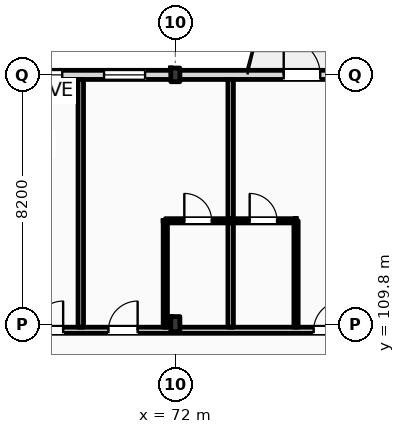
"""IFC4 building model, lengths in metres.
Left out: names, types, materials, properties, quantities, classifications, styles, units other than length and angle.
Written with IfcOpenShell. Run it as: python <this file> out.ifc"""

import sys

from ifc_helpers import new_model, si_unit, direction, frame, frame_2d, origin, origin_2d, place, context, subcontext, project, spatial, rectangle, i_section, extrude, element, fill, save


model = new_model("IFC4")
c1 = context("Model", 3, precision=1e-05, world=origin(), true_north=direction((0.0, 1.0)))
c2 = subcontext(c1, "Body", "Model", "MODEL_VIEW")
j1 = project(units=[si_unit("LENGTHUNIT", "METRE"), si_unit("PLANEANGLEUNIT", "RADIAN")], contexts=[c1])
p1 = place(None, origin())
s1 = spatial("IfcSite", under=j1, at=p1, CompositionType="ELEMENT")
p2 = place(p1, origin())
s2 = spatial("IfcBuilding", under=s1, at=p2, CompositionType="ELEMENT")
p3 = place(p2, frame((0.0, 0.0, 31.8)))
s3 = spatial("IfcBuildingStorey", under=s2, at=p3, CompositionType="ELEMENT", Elevation=31.8)
p4 = place(p3, frame((72.0, 109.8, 0.0), z_axis=(0.0, 0.0, 1.0), x_axis=(1.0, 0.0, 0.0)))
e1 = element("IfcColumn", 1, at=p4, inside=s3, PredefinedType="COLUMN", context=c2, shape_type="SweptSolid", body=[
    extrude(i_section(OverallWidth=0.3, OverallDepth=0.5, WebThickness=0.014, FlangeThickness=0.028, FilletRadius=0.027, at=origin_2d()), origin(), (0.0, 0.0, 1.0), 3.6),
])
p5 = place(p3, frame((72.0, 118.0, 0.0), z_axis=(0.0, 0.0, 1.0), x_axis=(1.0, 0.0, 0.0)))
e2 = element("IfcColumn", 2, at=p5, inside=s3, PredefinedType="COLUMN", context=c2, shape_type="SweptSolid", body=[
    extrude(i_section(OverallWidth=0.3, OverallDepth=0.45, WebThickness=0.014, FlangeThickness=0.026, FilletRadius=0.027, at=origin_2d()), origin(), (0.0, 0.0, 1.0), 3.6),
])
p6 = place(p3, frame((22.5, 118.0, 0.0), z_axis=(0.0, 0.0, 1.0), x_axis=(1.0, 0.0, 0.0)))
e3 = element("IfcWall", 3, at=p6, inside=s3, PredefinedType="STANDARD", context=c2, shape_type="SweptSolid", body=[
    extrude(rectangle(XDim=97.5, YDim=0.3, at=frame_2d((48.75, 0.0))), origin(), (0.0, 0.0, 1.0), 2.72),
])
p7 = place(p6, frame((3.61, 0.0, 0.9)))
e4 = element("IfcOpeningElement", 4, at=p7, cuts=e3, PredefinedType="OPENING", context=c2, shape_type="SweptSolid", body=[
    extrude(rectangle(XDim=1.1, YDim=1.64, at=frame_2d((0.55, 0.82))), frame((0.0, 0.16, 0.0), z_axis=(0.0, -1.0, 0.0), x_axis=(1.0, 0.0, 0.0)), (0.0, 0.0, 1.0), 0.32),
])
p8 = place(p6, frame((6.855, 0.0, 0.0)))
e5 = element("IfcOpeningElement", 5, at=p8, cuts=e3, PredefinedType="OPENING", context=c2, shape_type="SweptSolid", body=[
    extrude(rectangle(XDim=1.2, YDim=2.25, at=frame_2d((0.6, 1.125))), frame((0.0, 0.16, 0.0), z_axis=(0.0, -1.0, 0.0), x_axis=(1.0, 0.0, 0.0)), (0.0, 0.0, 1.0), 0.32),
])
p9 = place(p6, frame((11.405, 0.0, 0.9)))
e6 = element("IfcOpeningElement", 6, at=p9, cuts=e3, PredefinedType="OPENING", context=c2, shape_type="SweptSolid", body=[
    extrude(rectangle(XDim=2.1, YDim=1.64, at=frame_2d((1.05, 0.82))), frame((0.0, 0.16, 0.0), z_axis=(0.0, -1.0, 0.0), x_axis=(1.0, 0.0, 0.0)), (0.0, 0.0, 1.0), 0.32),
])
p10 = place(p6, frame((15.13, 0.0, 0.9)))
e7 = element("IfcOpeningElement", 7, at=p10, cuts=e3, PredefinedType="OPENING", context=c2, shape_type="SweptSolid", body=[
    extrude(rectangle(XDim=2.25, YDim=1.64, at=frame_2d((1.125, 0.82))), frame((0.0, 0.16, 0.0), z_axis=(0.0, -1.0, 0.0), x_axis=(1.0, 0.0, 0.0)), (0.0, 0.0, 1.0), 0.32),
])
p11 = place(p6, frame((21.53, 0.0, 0.0)))
e8 = element("IfcOpeningElement", 8, at=p11, cuts=e3, PredefinedType="OPENING", context=c2, shape_type="SweptSolid", body=[
    extrude(rectangle(XDim=1.2, YDim=2.25, at=frame_2d((0.6, 1.125))), frame((0.0, 0.16, 0.0), z_axis=(0.0, -1.0, 0.0), x_axis=(1.0, 0.0, 0.0)), (0.0, 0.0, 1.0), 0.32),
])
p12 = place(p6, frame((24.18, 0.0, 0.9)))
e9 = element("IfcOpeningElement", 9, at=p12, cuts=e3, PredefinedType="OPENING", context=c2, shape_type="SweptSolid", body=[
    extrude(rectangle(XDim=1.1, YDim=1.64, at=frame_2d((0.55, 0.82))), frame((0.0, 0.16, 0.0), z_axis=(0.0, -1.0, 0.0), x_axis=(1.0, 0.0, 0.0)), (0.0, 0.0, 1.0), 0.32),
])
p13 = place(p6, frame((29.105, 0.0, 0.9)))
e10 = element("IfcOpeningElement", 10, at=p13, cuts=e3, PredefinedType="OPENING", context=c2, shape_type="SweptSolid", body=[
    extrude(rectangle(XDim=2.7, YDim=1.64, at=frame_2d((1.35, 0.82))), frame((0.0, 0.16, 0.0), z_axis=(0.0, -1.0, 0.0), x_axis=(1.0, 0.0, 0.0)), (0.0, 0.0, 1.0), 0.32),
])
p14 = place(p6, frame((34.83, 0.0, 0.9)))
e11 = element("IfcOpeningElement", 11, at=p14, cuts=e3, PredefinedType="OPENING", context=c2, shape_type="SweptSolid", body=[
    extrude(rectangle(XDim=1.8, YDim=1.64, at=frame_2d((0.9, 0.82))), frame((0.0, 0.16, 0.0), z_axis=(0.0, -1.0, 0.0), x_axis=(1.0, 0.0, 0.0)), (0.0, 0.0, 1.0), 0.32),
])
p15 = place(p6, frame((38.525, 0.0, 0.0)))
e12 = element("IfcOpeningElement", 12, at=p15, cuts=e3, PredefinedType="OPENING", context=c2, shape_type="SweptSolid", body=[
    extrude(rectangle(XDim=1.2, YDim=2.25, at=frame_2d((0.6, 1.125))), frame((0.0, 0.16, 0.0), z_axis=(0.0, -1.0, 0.0), x_axis=(1.0, 0.0, 0.0)), (0.0, 0.0, 1.0), 0.32),
])
p16 = place(p6, frame((42.73, 0.0, 0.9)))
e13 = element("IfcOpeningElement", 13, at=p16, cuts=e3, PredefinedType="OPENING", context=c2, shape_type="SweptSolid", body=[
    extrude(rectangle(XDim=3.05, YDim=1.64, at=frame_2d((1.525, 0.82))), frame((0.0, 0.16, 0.0), z_axis=(0.0, -1.0, 0.0), x_axis=(1.0, 0.0, 0.0)), (0.0, 0.0, 1.0), 0.32),
])
p17 = place(p6, frame((47.155, 0.0, 0.9)))
e14 = element("IfcOpeningElement", 14, at=p17, cuts=e3, PredefinedType="OPENING", context=c2, shape_type="SweptSolid", body=[
    extrude(rectangle(XDim=1.35, YDim=1.64, at=frame_2d((0.675, 0.82))), frame((0.0, 0.16, 0.0), z_axis=(0.0, -1.0, 0.0), x_axis=(1.0, 0.0, 0.0)), (0.0, 0.0, 1.0), 0.32),
])
p18 = place(p6, frame((53.065, 0.0, 0.0)))
e15 = element("IfcOpeningElement", 15, at=p18, cuts=e3, PredefinedType="OPENING", context=c2, shape_type="SweptSolid", body=[
    extrude(rectangle(XDim=1.2, YDim=2.25, at=frame_2d((0.6, 1.125))), frame((0.0, 0.16, 0.0), z_axis=(0.0, -1.0, 0.0), x_axis=(1.0, 0.0, 0.0)), (0.0, 0.0, 1.0), 0.32),
])
p19 = place(p6, frame((58.2, 0.0, 0.9)))
e16 = element("IfcOpeningElement", 16, at=p19, cuts=e3, PredefinedType="OPENING", context=c2, shape_type="SweptSolid", body=[
    extrude(rectangle(XDim=1.8, YDim=1.64, at=frame_2d((0.9, 0.82))), frame((0.0, 0.16, 0.0), z_axis=(0.0, -1.0, 0.0), x_axis=(1.0, 0.0, 0.0)), (0.0, 0.0, 1.0), 0.32),
])
p20 = place(p6, frame((61.13, 0.0, 0.9)))
e17 = element("IfcOpeningElement", 17, at=p20, cuts=e3, PredefinedType="OPENING", context=c2, shape_type="SweptSolid", body=[
    extrude(rectangle(XDim=3.05, YDim=1.64, at=frame_2d((1.525, 0.82))), frame((0.0, 0.16, 0.0), z_axis=(0.0, -1.0, 0.0), x_axis=(1.0, 0.0, 0.0)), (0.0, 0.0, 1.0), 0.32),
])
p21 = place(p6, frame((67.93, 0.0, 0.0)))
e18 = element("IfcOpeningElement", 18, at=p21, cuts=e3, PredefinedType="OPENING", context=c2, shape_type="SweptSolid", body=[
    extrude(rectangle(XDim=1.2, YDim=2.25, at=frame_2d((0.6, 1.125))), frame((0.0, 0.16, 0.0), z_axis=(0.0, -1.0, 0.0), x_axis=(1.0, 0.0, 0.0)), (0.0, 0.0, 1.0), 0.32),
])
p22 = place(p6, frame((70.39, 0.0, 0.0)))
e19 = element("IfcOpeningElement", 19, at=p22, cuts=e3, PredefinedType="OPENING", context=c2, shape_type="SweptSolid", body=[
    extrude(rectangle(XDim=1.2, YDim=2.25, at=frame_2d((0.6, 1.125))), frame((0.0, 0.16, 0.0), z_axis=(0.0, -1.0, 0.0), x_axis=(1.0, 0.0, 0.0)), (0.0, 0.0, 1.0), 0.32),
])
p23 = place(p6, frame((75.905, 0.0, 0.9)))
e20 = element("IfcOpeningElement", 20, at=p23, cuts=e3, PredefinedType="OPENING", context=c2, shape_type="SweptSolid", body=[
    extrude(rectangle(XDim=1.1, YDim=1.5, at=frame_2d((0.55, 0.75))), frame((0.0, 0.16, 0.0), z_axis=(0.0, -1.0, 0.0), x_axis=(1.0, 0.0, 0.0)), (0.0, 0.0, 1.0), 0.32),
])
p24 = place(p6, frame((81.63, 0.0, 0.9)))
e21 = element("IfcOpeningElement", 21, at=p24, cuts=e3, PredefinedType="OPENING", context=c2, shape_type="SweptSolid", body=[
    extrude(rectangle(XDim=1.1, YDim=1.6, at=frame_2d((0.55, 0.8))), frame((0.0, 0.16, 0.0), z_axis=(0.0, -1.0, 0.0), x_axis=(1.0, 0.0, 0.0)), (0.0, 0.0, 1.0), 0.32),
])
p25 = place(p6, frame((84.955, 0.0, 0.9)))
e22 = element("IfcOpeningElement", 22, at=p25, cuts=e3, PredefinedType="OPENING", context=c2, shape_type="SweptSolid", body=[
    extrude(rectangle(XDim=1.4, YDim=1.64, at=frame_2d((0.7, 0.82))), frame((0.0, 0.16, 0.0), z_axis=(0.0, -1.0, 0.0), x_axis=(1.0, 0.0, 0.0)), (0.0, 0.0, 1.0), 0.32),
])
p26 = place(p6, frame((90.055, 0.0, 0.9)))
e23 = element("IfcOpeningElement", 23, at=p26, cuts=e3, PredefinedType="OPENING", context=c2, shape_type="SweptSolid", body=[
    extrude(rectangle(XDim=1.6, YDim=1.64, at=frame_2d((0.8, 0.82))), frame((0.0, 0.16, 0.0), z_axis=(0.0, -1.0, 0.0), x_axis=(1.0, 0.0, 0.0)), (0.0, 0.0, 1.0), 0.32),
])
p27 = place(p6, frame((93.87, 0.0, 0.9)))
e24 = element("IfcOpeningElement", 24, at=p27, cuts=e3, PredefinedType="OPENING", context=c2, shape_type="SweptSolid", body=[
    extrude(rectangle(XDim=1.75, YDim=1.64, at=frame_2d((0.875, 0.82))), frame((0.0, 0.16, 0.0), z_axis=(0.0, -1.0, 0.0), x_axis=(1.0, 0.0, 0.0)), (0.0, 0.0, 1.0), 0.32),
])
p28 = place(p3, frame((10.65, 109.6, 0.0), z_axis=(0.0, 0.0, 1.0), x_axis=(1.0, 0.0, 0.0)))
e25 = element("IfcWall", 25, at=p28, inside=s3, PredefinedType="PARTITIONING", context=c2, shape_type="SweptSolid", body=[
    extrude(rectangle(XDim=109.21, YDim=0.2, at=frame_2d((54.605, 0.0))), origin(), (0.0, 0.0, 1.0), 2.72),
])
p29 = place(p28, frame((15.825, 0.0, 0.0)))
e26 = element("IfcOpeningElement", 26, at=p29, cuts=e25, PredefinedType="OPENING", context=c2, shape_type="SweptSolid", body=[
    extrude(rectangle(XDim=1.02, YDim=2.2, at=frame_2d((0.51, 1.1))), frame((0.0, 0.11, 0.0), z_axis=(0.0, -1.0, 0.0), x_axis=(1.0, 0.0, 0.0)), (0.0, 0.0, 1.0), 0.22),
])
p30 = place(p28, frame((19.87, 0.0, 0.0)))
e27 = element("IfcOpeningElement", 27, at=p30, cuts=e25, PredefinedType="OPENING", context=c2, shape_type="SweptSolid", body=[
    extrude(rectangle(XDim=1.02, YDim=2.2, at=frame_2d((0.51, 1.1))), frame((0.0, 0.11, 0.0), z_axis=(0.0, -1.0, 0.0), x_axis=(1.0, 0.0, 0.0)), (0.0, 0.0, 1.0), 0.22),
])
p31 = place(p28, frame((24.47, 0.0, 0.0)))
e28 = element("IfcOpeningElement", 28, at=p31, cuts=e25, PredefinedType="OPENING", context=c2, shape_type="SweptSolid", body=[
    extrude(rectangle(XDim=1.02, YDim=2.2, at=frame_2d((0.51, 1.1))), frame((0.0, 0.11, 0.0), z_axis=(0.0, -1.0, 0.0), x_axis=(1.0, 0.0, 0.0)), (0.0, 0.0, 1.0), 0.22),
])
p32 = place(p28, frame((26.92, 0.0, 0.0)))
e29 = element("IfcOpeningElement", 29, at=p32, cuts=e25, PredefinedType="OPENING", context=c2, shape_type="SweptSolid", body=[
    extrude(rectangle(XDim=1.02, YDim=2.2, at=frame_2d((0.51, 1.1))), frame((0.0, 0.11, 0.0), z_axis=(0.0, -1.0, 0.0), x_axis=(1.0, 0.0, 0.0)), (0.0, 0.0, 1.0), 0.22),
])
p33 = place(p28, frame((33.7, 0.0, 0.0)))
e30 = element("IfcOpeningElement", 30, at=p33, cuts=e25, PredefinedType="OPENING", context=c2, shape_type="SweptSolid", body=[
    extrude(rectangle(XDim=0.96, YDim=2.2, at=frame_2d((0.48, 1.1))), frame((0.0, 0.11, 0.0), z_axis=(0.0, -1.0, 0.0), x_axis=(1.0, 0.0, 0.0)), (0.0, 0.0, 1.0), 0.22),
])
p34 = place(p28, frame((35.9, 0.0, 0.0)))
e31 = element("IfcOpeningElement", 31, at=p34, cuts=e25, PredefinedType="OPENING", context=c2, shape_type="SweptSolid", body=[
    extrude(rectangle(XDim=0.96, YDim=2.2, at=frame_2d((0.48, 1.1))), frame((0.0, 0.11, 0.0), z_axis=(0.0, -1.0, 0.0), x_axis=(1.0, 0.0, 0.0)), (0.0, 0.0, 1.0), 0.22),
])
p35 = place(p28, frame((42.9, 0.0, 0.0)))
e32 = element("IfcOpeningElement", 32, at=p35, cuts=e25, PredefinedType="OPENING", context=c2, shape_type="SweptSolid", body=[
    extrude(rectangle(XDim=0.96, YDim=2.2, at=frame_2d((0.48, 1.1))), frame((0.0, 0.11, 0.0), z_axis=(0.0, -1.0, 0.0), x_axis=(1.0, 0.0, 0.0)), (0.0, 0.0, 1.0), 0.22),
])
p36 = place(p28, frame((47.5, 0.0, 0.0)))
e33 = element("IfcOpeningElement", 33, at=p36, cuts=e25, PredefinedType="OPENING", context=c2, shape_type="SweptSolid", body=[
    extrude(rectangle(XDim=0.96, YDim=2.2, at=frame_2d((0.48, 1.1))), frame((0.0, 0.11, 0.0), z_axis=(0.0, -1.0, 0.0), x_axis=(1.0, 0.0, 0.0)), (0.0, 0.0, 1.0), 0.22),
])
p37 = place(p28, frame((49.95, 0.0, 0.0)))
e34 = element("IfcOpeningElement", 34, at=p37, cuts=e25, PredefinedType="OPENING", context=c2, shape_type="SweptSolid", body=[
    extrude(rectangle(XDim=0.96, YDim=2.2, at=frame_2d((0.48, 1.1))), frame((0.0, 0.11, 0.0), z_axis=(0.0, -1.0, 0.0), x_axis=(1.0, 0.0, 0.0)), (0.0, 0.0, 1.0), 0.22),
])
p38 = place(p28, frame((56.7, 0.0, 0.0)))
e35 = element("IfcOpeningElement", 35, at=p38, cuts=e25, PredefinedType="OPENING", context=c2, shape_type="SweptSolid", body=[
    extrude(rectangle(XDim=0.96, YDim=2.2, at=frame_2d((0.48, 1.1))), frame((0.0, 0.11, 0.0), z_axis=(0.0, -1.0, 0.0), x_axis=(1.0, 0.0, 0.0)), (0.0, 0.0, 1.0), 0.22),
])
p39 = place(p28, frame((59.15, 0.0, 0.0)))
e36 = element("IfcOpeningElement", 36, at=p39, cuts=e25, PredefinedType="OPENING", context=c2, shape_type="SweptSolid", body=[
    extrude(rectangle(XDim=0.96, YDim=2.2, at=frame_2d((0.48, 1.1))), frame((0.0, 0.11, 0.0), z_axis=(0.0, -1.0, 0.0), x_axis=(1.0, 0.0, 0.0)), (0.0, 0.0, 1.0), 0.22),
])
p40 = place(p28, frame((65.9, 0.0, 0.0)))
e37 = element("IfcOpeningElement", 37, at=p40, cuts=e25, PredefinedType="OPENING", context=c2, shape_type="SweptSolid", body=[
    extrude(rectangle(XDim=0.96, YDim=2.2, at=frame_2d((0.48, 1.1))), frame((0.0, 0.11, 0.0), z_axis=(0.0, -1.0, 0.0), x_axis=(1.0, 0.0, 0.0)), (0.0, 0.0, 1.0), 0.22),
])
p41 = place(p28, frame((70.5, 0.0, 0.0)))
e38 = element("IfcOpeningElement", 38, at=p41, cuts=e25, PredefinedType="OPENING", context=c2, shape_type="SweptSolid", body=[
    extrude(rectangle(XDim=0.96, YDim=2.2, at=frame_2d((0.48, 1.1))), frame((0.0, 0.11, 0.0), z_axis=(0.0, -1.0, 0.0), x_axis=(1.0, 0.0, 0.0)), (0.0, 0.0, 1.0), 0.22),
])
p42 = place(p28, frame((72.95, 0.0, 0.0)))
e39 = element("IfcOpeningElement", 39, at=p42, cuts=e25, PredefinedType="OPENING", context=c2, shape_type="SweptSolid", body=[
    extrude(rectangle(XDim=0.96, YDim=2.2, at=frame_2d((0.48, 1.1))), frame((0.0, 0.11, 0.0), z_axis=(0.0, -1.0, 0.0), x_axis=(1.0, 0.0, 0.0)), (0.0, 0.0, 1.0), 0.22),
])
p43 = place(p28, frame((79.7, 0.0, 0.0)))
e40 = element("IfcOpeningElement", 40, at=p43, cuts=e25, PredefinedType="OPENING", context=c2, shape_type="SweptSolid", body=[
    extrude(rectangle(XDim=0.96, YDim=2.2, at=frame_2d((0.48, 1.1))), frame((0.0, 0.11, 0.0), z_axis=(0.0, -1.0, 0.0), x_axis=(1.0, 0.0, 0.0)), (0.0, 0.0, 1.0), 0.22),
])
p44 = place(p28, frame((82.15, 0.0, 0.0)))
e41 = element("IfcOpeningElement", 41, at=p44, cuts=e25, PredefinedType="OPENING", context=c2, shape_type="SweptSolid", body=[
    extrude(rectangle(XDim=0.96, YDim=2.2, at=frame_2d((0.48, 1.1))), frame((0.0, 0.11, 0.0), z_axis=(0.0, -1.0, 0.0), x_axis=(1.0, 0.0, 0.0)), (0.0, 0.0, 1.0), 0.22),
])
p45 = place(p28, frame((88.9, 0.0, 0.0)))
e42 = element("IfcOpeningElement", 42, at=p45, cuts=e25, PredefinedType="OPENING", context=c2, shape_type="SweptSolid", body=[
    extrude(rectangle(XDim=0.96, YDim=2.2, at=frame_2d((0.48, 1.1))), frame((0.0, 0.11, 0.0), z_axis=(0.0, -1.0, 0.0), x_axis=(1.0, 0.0, 0.0)), (0.0, 0.0, 1.0), 0.22),
])
p46 = place(p28, frame((93.75, 0.0, 0.0)))
e43 = element("IfcOpeningElement", 43, at=p46, cuts=e25, PredefinedType="OPENING", context=c2, shape_type="SweptSolid", body=[
    extrude(rectangle(XDim=0.96, YDim=2.2, at=frame_2d((0.48, 1.1))), frame((0.0, 0.11, 0.0), z_axis=(0.0, -1.0, 0.0), x_axis=(1.0, 0.0, 0.0)), (0.0, 0.0, 1.0), 0.22),
])
p47 = place(p28, frame((98.1, 0.0, 0.0)))
e44 = element("IfcOpeningElement", 44, at=p47, cuts=e25, PredefinedType="OPENING", context=c2, shape_type="SweptSolid", body=[
    extrude(rectangle(XDim=0.96, YDim=2.2, at=frame_2d((0.48, 1.1))), frame((0.0, 0.11, 0.0), z_axis=(0.0, -1.0, 0.0), x_axis=(1.0, 0.0, 0.0)), (0.0, 0.0, 1.0), 0.22),
])
p48 = place(p28, frame((102.7, 0.0, 0.0)))
e45 = element("IfcOpeningElement", 45, at=p48, cuts=e25, PredefinedType="OPENING", context=c2, shape_type="SweptSolid", body=[
    extrude(rectangle(XDim=0.96, YDim=2.2, at=frame_2d((0.48, 1.1))), frame((0.0, 0.11, 0.0), z_axis=(0.0, -1.0, 0.0), x_axis=(1.0, 0.0, 0.0)), (0.0, 0.0, 1.0), 0.22),
])
p49 = place(p28, frame((105.04, 0.0, 0.0)))
e46 = element("IfcOpeningElement", 46, at=p49, cuts=e25, PredefinedType="OPENING", context=c2, shape_type="SweptSolid", body=[
    extrude(rectangle(XDim=0.96, YDim=2.2, at=frame_2d((0.48, 1.1))), frame((0.0, 0.11, 0.0), z_axis=(0.0, -1.0, 0.0), x_axis=(1.0, 0.0, 0.0)), (0.0, 0.0, 1.0), 0.22),
])
p50 = place(p28, frame((2.716, 0.0, 0.0)))
e47 = element("IfcOpeningElement", 47, at=p50, cuts=e25, PredefinedType="OPENING", context=c2, shape_type="SweptSolid", body=[
    extrude(rectangle(XDim=1.35, YDim=2.25, at=frame_2d((0.675, 1.125))), frame((0.0, 0.11, 0.0), z_axis=(0.0, -1.0, 0.0), x_axis=(1.0, 0.0, 0.0)), (0.0, 0.0, 1.0), 0.22),
])
p51 = place(p28, frame((6.65, 0.0, 0.0)))
e48 = element("IfcOpeningElement", 48, at=p51, cuts=e25, PredefinedType="OPENING", context=c2, shape_type="SweptSolid", body=[
    extrude(rectangle(XDim=1.35, YDim=2.25, at=frame_2d((0.675, 1.125))), frame((0.0, 0.11, 0.0), z_axis=(0.0, -1.0, 0.0), x_axis=(1.0, 0.0, 0.0)), (0.0, 0.0, 1.0), 0.22),
])
p52 = place(p28, frame((10.583, 0.0, 0.0)))
e49 = element("IfcOpeningElement", 49, at=p52, cuts=e25, PredefinedType="OPENING", context=c2, shape_type="SweptSolid", body=[
    extrude(rectangle(XDim=1.35, YDim=2.25, at=frame_2d((0.675, 1.125))), frame((0.0, 0.11, 0.0), z_axis=(0.0, -1.0, 0.0), x_axis=(1.0, 0.0, 0.0)), (0.0, 0.0, 1.0), 0.22),
])
for number, where, z_axis, x_axis in (
    (50, (68.89, 109.7, 0.0), (0.0, 0.0, 1.0), (0.0, 1.0, 0.0)),
    (51, (73.82, 109.7, 0.0), (0.0, 0.0, 1.0), (0.0, 1.0, 0.0)),
):
    element("IfcWall", number, at=place(p3, frame(where, z_axis=z_axis, x_axis=x_axis)), inside=s3, PredefinedType="PARTITIONING", context=c2, shape_type="SweptSolid", body=[
        extrude(rectangle(XDim=8.15, YDim=0.18, at=frame_2d((4.075, 0.0))), origin(), (0.0, 0.0, 1.0), 3.36),
    ])
p53 = place(p3, frame((71.67, 109.7, 0.0), z_axis=(0.0, 0.0, 1.0), x_axis=(0.0, 1.0, 0.0)))
e52 = element("IfcWall", 52, at=p53, inside=s3, PredefinedType="PARTITIONING", context=c2, shape_type="SweptSolid", body=[
    extrude(rectangle(XDim=3.5, YDim=0.14, at=frame_2d((1.75, 0.0))), origin(), (0.0, 0.0, 1.0), 3.36),
])
p54 = place(p3, frame((71.67, 113.2, 0.0), z_axis=(0.0, 0.0, 1.0), x_axis=(1.0, 0.0, 0.0)))
e53 = element("IfcWall", 53, at=p54, inside=s3, PredefinedType="PARTITIONING", context=c2, shape_type="SweptSolid", body=[
    extrude(rectangle(XDim=2.15, YDim=0.14, at=frame_2d((1.075, 0.0))), origin(), (0.0, 0.0, 1.0), 3.36),
])
p55 = place(p54, frame((0.625, 0.0, 0.0)))
e54 = element("IfcOpeningElement", 54, at=p55, cuts=e53, PredefinedType="OPENING", context=c2, shape_type="SweptSolid", body=[
    extrude(rectangle(XDim=0.9, YDim=2.1, at=frame_2d((0.45, 1.05))), frame((0.0, 0.08, 0.0), z_axis=(0.0, -1.0, 0.0), x_axis=(1.0, 0.0, 0.0)), (0.0, 0.0, 1.0), 0.16),
])
p56 = place(p3, frame((75.97, 109.7, 0.0), z_axis=(0.0, 0.0, 1.0), x_axis=(0.0, 1.0, 0.0)))
e55 = element("IfcWall", 55, at=p56, inside=s3, PredefinedType="PARTITIONING", context=c2, shape_type="SweptSolid", body=[
    extrude(rectangle(XDim=3.5, YDim=0.14, at=frame_2d((1.75, 0.0))), origin(), (0.0, 0.0, 1.0), 3.36),
])
p57 = place(p3, frame((73.82, 113.2, 0.0), z_axis=(0.0, 0.0, 1.0), x_axis=(1.0, 0.0, 0.0)))
e56 = element("IfcWall", 56, at=p57, inside=s3, PredefinedType="PARTITIONING", context=c2, shape_type="SweptSolid", body=[
    extrude(rectangle(XDim=2.15, YDim=0.14, at=frame_2d((1.075, 0.0))), origin(), (0.0, 0.0, 1.0), 3.36),
])
p58 = place(p57, frame((0.625, 0.0, 0.0)))
e57 = element("IfcOpeningElement", 57, at=p58, cuts=e56, PredefinedType="OPENING", context=c2, shape_type="SweptSolid", body=[
    extrude(rectangle(XDim=0.9, YDim=2.1, at=frame_2d((0.45, 1.05))), frame((0.0, 0.08, 0.0), z_axis=(0.0, -1.0, 0.0), x_axis=(1.0, 0.0, 0.0)), (0.0, 0.0, 1.0), 0.16),
])
p59 = place(p16, origin())
e58 = element("IfcWindow", 58, at=p59, inside=s3, PartitioningType="DOUBLE_PANEL_VERTICAL", PredefinedType="WINDOW", context=c2, shape_type="SweptSolid", body=[
    extrude(rectangle(XDim=3.05, YDim=1.64, at=frame_2d((1.525, 0.82))), frame((0.0, 0.03, 0.0), z_axis=(0.0, -1.0, 0.0), x_axis=(1.0, 0.0, 0.0)), (0.0, 0.0, 1.0), 0.06),
])
fill(e13, e58)
p60 = place(p17, origin())
e59 = element("IfcWindow", 59, at=p60, inside=s3, PartitioningType="DOUBLE_PANEL_VERTICAL", PredefinedType="WINDOW", context=c2, shape_type="SweptSolid", body=[
    extrude(rectangle(XDim=1.35, YDim=1.64, at=frame_2d((0.675, 0.82))), frame((0.0, 0.03, 0.0), z_axis=(0.0, -1.0, 0.0), x_axis=(1.0, 0.0, 0.0)), (0.0, 0.0, 1.0), 0.06),
])
fill(e14, e59)
p61 = place(p18, origin())
e60 = element("IfcDoor", 60, at=p61, inside=s3, OperationType="SINGLE_SWING_LEFT", PredefinedType="DOOR", context=c2, shape_type="SweptSolid", body=[
    extrude(rectangle(XDim=1.2, YDim=2.25, at=frame_2d((0.6, 1.125))), frame((0.0, 0.025, 0.0), z_axis=(0.0, -1.0, 0.0), x_axis=(1.0, 0.0, 0.0)), (0.0, 0.0, 1.0), 0.05),
])
fill(e15, e60)
p62 = place(p38, origin())
e61 = element("IfcDoor", 61, at=p62, inside=s3, OperationType="SINGLE_SWING_RIGHT", PredefinedType="DOOR", context=c2, shape_type="SweptSolid", body=[
    extrude(rectangle(XDim=0.96, YDim=2.2, at=frame_2d((0.48, 1.1))), frame((0.0, 0.025, 0.0), z_axis=(0.0, -1.0, 0.0), x_axis=(1.0, 0.0, 0.0)), (0.0, 0.0, 1.0), 0.05),
])
fill(e35, e61)
p63 = place(p39, origin())
e62 = element("IfcDoor", 62, at=p63, inside=s3, OperationType="SINGLE_SWING_RIGHT", PredefinedType="DOOR", context=c2, shape_type="SweptSolid", body=[
    extrude(rectangle(XDim=0.96, YDim=2.2, at=frame_2d((0.48, 1.1))), frame((0.0, 0.025, 0.0), z_axis=(0.0, -1.0, 0.0), x_axis=(1.0, 0.0, 0.0)), (0.0, 0.0, 1.0), 0.05),
])
fill(e36, e62)
p64 = place(p55, origin())
e63 = element("IfcDoor", 63, at=p64, inside=s3, OperationType="SINGLE_SWING_LEFT", PredefinedType="DOOR", context=c2, shape_type="SweptSolid", body=[
    extrude(rectangle(XDim=0.9, YDim=2.1, at=frame_2d((0.45, 1.05))), frame((0.0, 0.025, 0.0), z_axis=(0.0, -1.0, 0.0), x_axis=(1.0, 0.0, 0.0)), (0.0, 0.0, 1.0), 0.05),
])
fill(e54, e63)
p65 = place(p40, origin())
e64 = element("IfcDoor", 64, at=p65, inside=s3, OperationType="SINGLE_SWING_RIGHT", PredefinedType="DOOR", context=c2, shape_type="SweptSolid", body=[
    extrude(rectangle(XDim=0.96, YDim=2.2, at=frame_2d((0.48, 1.1))), frame((0.0, 0.025, 0.0), z_axis=(0.0, -1.0, 0.0), x_axis=(1.0, 0.0, 0.0)), (0.0, 0.0, 1.0), 0.05),
])
fill(e37, e64)
p66 = place(p58, origin())
e65 = element("IfcDoor", 65, at=p66, inside=s3, OperationType="SINGLE_SWING_LEFT", PredefinedType="DOOR", context=c2, shape_type="SweptSolid", body=[
    extrude(rectangle(XDim=0.9, YDim=2.1, at=frame_2d((0.45, 1.05))), frame((0.0, 0.025, 0.0), z_axis=(0.0, -1.0, 0.0), x_axis=(1.0, 0.0, 0.0)), (0.0, 0.0, 1.0), 0.05),
])
fill(e57, e65)
save(model, sys.argv[1])
